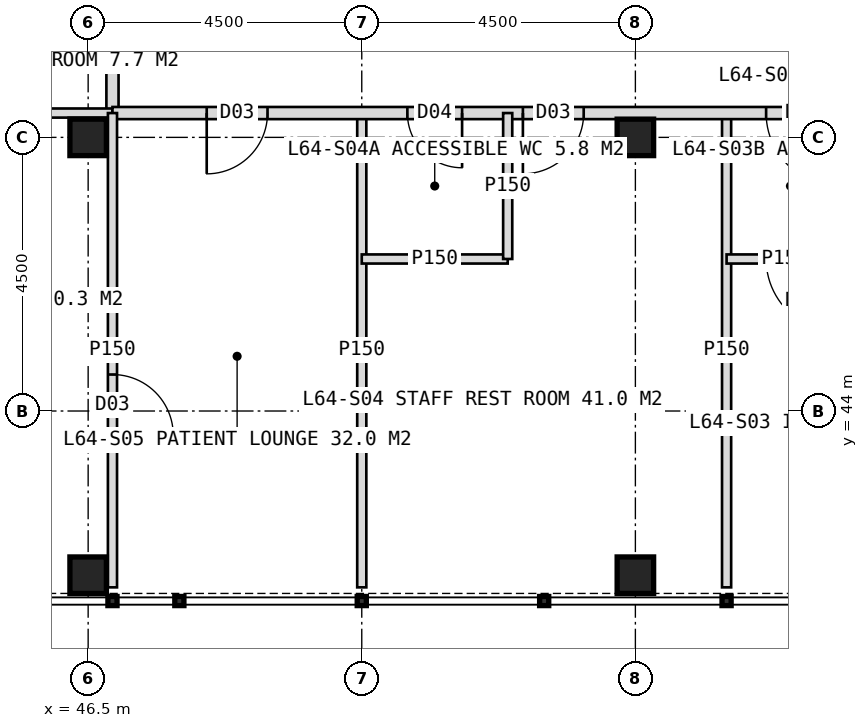
"""IFC4 building model, lengths in metres.
Left out: names, types, materials, properties, quantities, classifications, styles, units other than length and angle.
Written with IfcOpenShell. Run it as: python <this file> out.ifc"""

import sys

from ifc_helpers import new_model, si_unit, direction, frame, frame_2d, origin, origin_2d, place, context, subcontext, project, spatial, rectangle, hollow_rectangle, extrude, element, fill, save


model = new_model("IFC4")
c1 = context("Model", 3, precision=1e-05, world=origin(), true_north=direction((0.0, 1.0)))
c2 = subcontext(c1, "Body", "Model", "MODEL_VIEW")
j1 = project(units=[si_unit("LENGTHUNIT", "METRE"), si_unit("PLANEANGLEUNIT", "RADIAN")], contexts=[c1])
p1 = place(None, origin())
s1 = spatial("IfcSite", under=j1, at=p1, CompositionType="ELEMENT")
p2 = place(p1, origin())
s2 = spatial("IfcBuilding", under=s1, at=p2, CompositionType="ELEMENT")
p3 = place(p2, frame((0.0, 0.0, 266.0)))
s3 = spatial("IfcBuildingStorey", under=s2, at=p3, CompositionType="ELEMENT", Elevation=266.0)
for number, where, z_axis, x_axis in (
    (1, (46.5, 48.5, 0.0), (0.0, 0.0, 1.0), (1.0, 0.0, 0.0)),
    (2, (55.5, 48.5, 0.0), (0.0, 0.0, 1.0), (1.0, 0.0, 0.0)),
    (3, (46.5, 41.3, 0.0), (0.0, 0.0, 1.0), (1.0, 0.0, 0.0)),
    (4, (55.5, 41.3, 0.0), (0.0, 0.0, 1.0), (1.0, 0.0, 0.0)),
):
    element("IfcColumn", number, at=place(p3, frame(where, z_axis=z_axis, x_axis=x_axis)), inside=s3, PredefinedType="COLUMN", context=c2, shape_type="SweptSolid", body=[
        extrude(hollow_rectangle(XDim=0.6, YDim=0.6, WallThickness=0.04, at=origin_2d()), origin(), (0.0, 0.0, 1.0), 4.0),
    ])
p4 = place(p3, frame((46.9, 48.9, 0.0), z_axis=(0.0, 0.0, 1.0), x_axis=(0.0, 1.0, 0.0)))
e5 = element("IfcWall", 5, at=p4, inside=s3, PredefinedType="PARTITIONING", context=c2, shape_type="SweptSolid", body=[
    extrude(rectangle(XDim=26.2, YDim=0.2, at=frame_2d((13.1, 0.0))), origin(), (0.0, 0.0, 1.0), 3.75),
])
p5 = place(p4, frame((1.75, 0.0, 0.0)))
e6 = element("IfcOpeningElement", 6, at=p5, cuts=e5, PredefinedType="OPENING", context=c2, shape_type="SweptSolid", body=[
    extrude(rectangle(XDim=1.2, YDim=2.2, at=frame_2d((0.6, 1.1))), frame((0.0, 0.11, 0.0), z_axis=(0.0, -1.0, 0.0), x_axis=(1.0, 0.0, 0.0)), (0.0, 0.0, 1.0), 0.22),
])
p6 = place(p4, frame((6.75, 0.0, 0.0)))
e7 = element("IfcOpeningElement", 7, at=p6, cuts=e5, PredefinedType="OPENING", context=c2, shape_type="SweptSolid", body=[
    extrude(rectangle(XDim=1.0, YDim=2.1, at=frame_2d((0.5, 1.05))), frame((0.0, 0.11, 0.0), z_axis=(0.0, -1.0, 0.0), x_axis=(1.0, 0.0, 0.0)), (0.0, 0.0, 1.0), 0.22),
])
p7 = place(p4, frame((11.1, 0.0, 0.0)))
e8 = element("IfcOpeningElement", 8, at=p7, cuts=e5, PredefinedType="OPENING", context=c2, shape_type="SweptSolid", body=[
    extrude(rectangle(XDim=1.0, YDim=2.1, at=frame_2d((0.5, 1.05))), frame((0.0, 0.11, 0.0), z_axis=(0.0, -1.0, 0.0), x_axis=(1.0, 0.0, 0.0)), (0.0, 0.0, 1.0), 0.22),
])
p8 = place(p4, frame((14.1, 0.0, 0.0)))
e9 = element("IfcOpeningElement", 9, at=p8, cuts=e5, PredefinedType="OPENING", context=c2, shape_type="SweptSolid", body=[
    extrude(rectangle(XDim=1.0, YDim=2.1, at=frame_2d((0.5, 1.05))), frame((0.0, 0.11, 0.0), z_axis=(0.0, -1.0, 0.0), x_axis=(1.0, 0.0, 0.0)), (0.0, 0.0, 1.0), 0.22),
])
p9 = place(p4, frame((18.6, 0.0, 0.0)))
e10 = element("IfcOpeningElement", 10, at=p9, cuts=e5, PredefinedType="OPENING", context=c2, shape_type="SweptSolid", body=[
    extrude(rectangle(XDim=1.0, YDim=2.1, at=frame_2d((0.5, 1.05))), frame((0.0, 0.11, 0.0), z_axis=(0.0, -1.0, 0.0), x_axis=(1.0, 0.0, 0.0)), (0.0, 0.0, 1.0), 0.22),
])
p10 = place(p4, frame((23.65, 0.0, 0.0)))
e11 = element("IfcOpeningElement", 11, at=p10, cuts=e5, PredefinedType="OPENING", context=c2, shape_type="SweptSolid", body=[
    extrude(rectangle(XDim=1.0, YDim=2.1, at=frame_2d((0.5, 1.05))), frame((0.0, 0.11, 0.0), z_axis=(0.0, -1.0, 0.0), x_axis=(1.0, 0.0, 0.0)), (0.0, 0.0, 1.0), 0.22),
])
for number, where, z_axis, x_axis in (
    (12, (46.9, 48.9, 0.0), (0.0, 0.0, 1.0), (-1.0, 0.0, 0.0)),
    (13, (57.0, 48.9, 0.0), (0.0, 0.0, 1.0), (0.0, -1.0, 0.0)),
    (14, (51.0, 48.9, 0.0), (0.0, 0.0, 1.0), (0.0, -1.0, 0.0)),
):
    element("IfcWall", number, at=place(p3, frame(where, z_axis=z_axis, x_axis=x_axis)), inside=s3, PredefinedType="PARTITIONING", context=c2, shape_type="SweptSolid", body=[
        extrude(rectangle(XDim=7.8, YDim=0.15, at=frame_2d((3.9, 0.0))), origin(), (0.0, 0.0, 1.0), 3.75),
    ])
p11 = place(p3, frame((73.1, 48.9, 0.0), z_axis=(0.0, 0.0, 1.0), x_axis=(-1.0, 0.0, 0.0)))
e15 = element("IfcWall", 15, at=p11, inside=s3, PredefinedType="PARTITIONING", context=c2, shape_type="SweptSolid", body=[
    extrude(rectangle(XDim=26.2, YDim=0.2, at=frame_2d((13.1, 0.0))), origin(), (0.0, 0.0, 1.0), 3.75),
])
p12 = place(p11, frame((1.75, 0.0, 0.0)))
e16 = element("IfcOpeningElement", 16, at=p12, cuts=e15, PredefinedType="OPENING", context=c2, shape_type="SweptSolid", body=[
    extrude(rectangle(XDim=1.2, YDim=2.2, at=frame_2d((0.6, 1.1))), frame((0.0, 0.11, 0.0), z_axis=(0.0, -1.0, 0.0), x_axis=(1.0, 0.0, 0.0)), (0.0, 0.0, 1.0), 0.22),
])
p13 = place(p11, frame((6.75, 0.0, 0.0)))
e17 = element("IfcOpeningElement", 17, at=p13, cuts=e15, PredefinedType="OPENING", context=c2, shape_type="SweptSolid", body=[
    extrude(rectangle(XDim=1.0, YDim=2.1, at=frame_2d((0.5, 1.05))), frame((0.0, 0.11, 0.0), z_axis=(0.0, -1.0, 0.0), x_axis=(1.0, 0.0, 0.0)), (0.0, 0.0, 1.0), 0.22),
])
p14 = place(p11, frame((14.25, 0.0, 0.0)))
e18 = element("IfcOpeningElement", 18, at=p14, cuts=e15, PredefinedType="OPENING", context=c2, shape_type="SweptSolid", body=[
    extrude(rectangle(XDim=1.2, YDim=2.2, at=frame_2d((0.6, 1.1))), frame((0.0, 0.11, 0.0), z_axis=(0.0, -1.0, 0.0), x_axis=(1.0, 0.0, 0.0)), (0.0, 0.0, 1.0), 0.22),
])
p15 = place(p11, frame((20.45, 0.0, 0.0)))
e19 = element("IfcOpeningElement", 19, at=p15, cuts=e15, PredefinedType="OPENING", context=c2, shape_type="SweptSolid", body=[
    extrude(rectangle(XDim=0.9, YDim=2.1, at=frame_2d((0.45, 1.05))), frame((0.0, 0.11, 0.0), z_axis=(0.0, -1.0, 0.0), x_axis=(1.0, 0.0, 0.0)), (0.0, 0.0, 1.0), 0.22),
])
p16 = place(p11, frame((18.45, 0.0, 0.0)))
e20 = element("IfcOpeningElement", 20, at=p16, cuts=e15, PredefinedType="OPENING", context=c2, shape_type="SweptSolid", body=[
    extrude(rectangle(XDim=1.0, YDim=2.1, at=frame_2d((0.5, 1.05))), frame((0.0, 0.11, 0.0), z_axis=(0.0, -1.0, 0.0), x_axis=(1.0, 0.0, 0.0)), (0.0, 0.0, 1.0), 0.22),
])
p17 = place(p11, frame((23.65, 0.0, 0.0)))
e21 = element("IfcOpeningElement", 21, at=p17, cuts=e15, PredefinedType="OPENING", context=c2, shape_type="SweptSolid", body=[
    extrude(rectangle(XDim=1.0, YDim=2.1, at=frame_2d((0.5, 1.05))), frame((0.0, 0.11, 0.0), z_axis=(0.0, -1.0, 0.0), x_axis=(1.0, 0.0, 0.0)), (0.0, 0.0, 1.0), 0.22),
])
p18 = place(p3, frame((59.1, 46.5, 0.0), z_axis=(0.0, 0.0, 1.0), x_axis=(-1.0, 0.0, 0.0)))
e22 = element("IfcWall", 22, at=p18, inside=s3, PredefinedType="PARTITIONING", context=c2, shape_type="SweptSolid", body=[
    extrude(rectangle(XDim=2.1, YDim=0.15, at=frame_2d((1.05, 0.0))), origin(), (0.0, 0.0, 1.0), 3.75),
])
p19 = place(p18, frame((0.25, 0.0, 0.0)))
e23 = element("IfcOpeningElement", 23, at=p19, cuts=e22, PredefinedType="OPENING", context=c2, shape_type="SweptSolid", body=[
    extrude(rectangle(XDim=1.2, YDim=2.2, at=frame_2d((0.6, 1.1))), frame((0.0, 0.085, 0.0), z_axis=(0.0, -1.0, 0.0), x_axis=(1.0, 0.0, 0.0)), (0.0, 0.0, 1.0), 0.17),
])
for number, where, z_axis, x_axis in (
    (24, (53.4, 46.5, 0.0), (0.0, 0.0, 1.0), (-1.0, 0.0, 0.0)),
    (25, (53.4, 48.9, 0.0), (0.0, 0.0, 1.0), (0.0, -1.0, 0.0)),
):
    element("IfcWall", number, at=place(p3, frame(where, z_axis=z_axis, x_axis=x_axis)), inside=s3, PredefinedType="PARTITIONING", context=c2, shape_type="SweptSolid", body=[
        extrude(rectangle(XDim=2.4, YDim=0.15, at=frame_2d((1.2, 0.0))), origin(), (0.0, 0.0, 1.0), 3.75),
    ])
p20 = place(p3, frame((46.9, 48.9, 0.0), z_axis=(0.0, 0.0, 1.0), x_axis=(0.0, -1.0, 0.0)))
e26 = element("IfcWall", 26, at=p20, inside=s3, PredefinedType="PARTITIONING", context=c2, shape_type="SweptSolid", body=[
    extrude(rectangle(XDim=7.8, YDim=0.15, at=frame_2d((3.9, 0.0))), origin(), (0.0, 0.0, 1.0), 3.75),
])
p21 = place(p20, frame((4.3, 0.0, 0.0)))
e27 = element("IfcOpeningElement", 27, at=p21, cuts=e26, PredefinedType="OPENING", context=c2, shape_type="SweptSolid", body=[
    extrude(rectangle(XDim=1.0, YDim=2.1, at=frame_2d((0.5, 1.05))), frame((0.0, 0.085, 0.0), z_axis=(0.0, -1.0, 0.0), x_axis=(1.0, 0.0, 0.0)), (0.0, 0.0, 1.0), 0.17),
])
p22 = place(p19, origin())
e28 = element("IfcDoor", 28, at=p22, inside=s3, OperationType="SINGLE_SWING_LEFT", PredefinedType="DOOR", context=c2, shape_type="SweptSolid", body=[
    extrude(rectangle(XDim=1.2, YDim=2.2, at=frame_2d((0.6, 1.1))), frame((0.0, 0.025, 0.0), z_axis=(0.0, -1.0, 0.0), x_axis=(1.0, 0.0, 0.0)), (0.0, 0.0, 1.0), 0.05),
])
fill(e23, e28)
p23 = place(p14, origin())
e29 = element("IfcDoor", 29, at=p23, inside=s3, OperationType="SINGLE_SWING_LEFT", PredefinedType="DOOR", context=c2, shape_type="SweptSolid", body=[
    extrude(rectangle(XDim=1.2, YDim=2.2, at=frame_2d((0.6, 1.1))), frame((0.0, 0.025, 0.0), z_axis=(0.0, -1.0, 0.0), x_axis=(1.0, 0.0, 0.0)), (0.0, 0.0, 1.0), 0.05),
])
fill(e18, e29)
p24 = place(p15, origin())
e30 = element("IfcDoor", 30, at=p24, inside=s3, OperationType="SINGLE_SWING_LEFT", PredefinedType="DOOR", context=c2, shape_type="SweptSolid", body=[
    extrude(rectangle(XDim=0.9, YDim=2.1, at=frame_2d((0.45, 1.05))), frame((0.0, 0.025, 0.0), z_axis=(0.0, -1.0, 0.0), x_axis=(1.0, 0.0, 0.0)), (0.0, 0.0, 1.0), 0.05),
])
fill(e19, e30)
p25 = place(p16, origin())
e31 = element("IfcDoor", 31, at=p25, inside=s3, OperationType="SINGLE_SWING_RIGHT", PredefinedType="DOOR", context=c2, shape_type="SweptSolid", body=[
    extrude(rectangle(XDim=1.0, YDim=2.1, at=frame_2d((0.5, 1.05))), frame((0.0, 0.025, 0.0), z_axis=(0.0, -1.0, 0.0), x_axis=(1.0, 0.0, 0.0)), (0.0, 0.0, 1.0), 0.05),
])
fill(e20, e31)
p26 = place(p21, origin())
e32 = element("IfcDoor", 32, at=p26, inside=s3, OperationType="SINGLE_SWING_RIGHT", PredefinedType="DOOR", context=c2, shape_type="SweptSolid", body=[
    extrude(rectangle(XDim=1.0, YDim=2.1, at=frame_2d((0.5, 1.05))), frame((0.0, 0.025, 0.0), z_axis=(0.0, -1.0, 0.0), x_axis=(1.0, 0.0, 0.0)), (0.0, 0.0, 1.0), 0.05),
])
fill(e27, e32)
p27 = place(p17, origin())
e33 = element("IfcDoor", 33, at=p27, inside=s3, OperationType="SINGLE_SWING_RIGHT", PredefinedType="DOOR", context=c2, shape_type="SweptSolid", body=[
    extrude(rectangle(XDim=1.0, YDim=2.1, at=frame_2d((0.5, 1.05))), frame((0.0, 0.025, 0.0), z_axis=(0.0, -1.0, 0.0), x_axis=(1.0, 0.0, 0.0)), (0.0, 0.0, 1.0), 0.05),
])
fill(e21, e33)
save(model, sys.argv[1])
